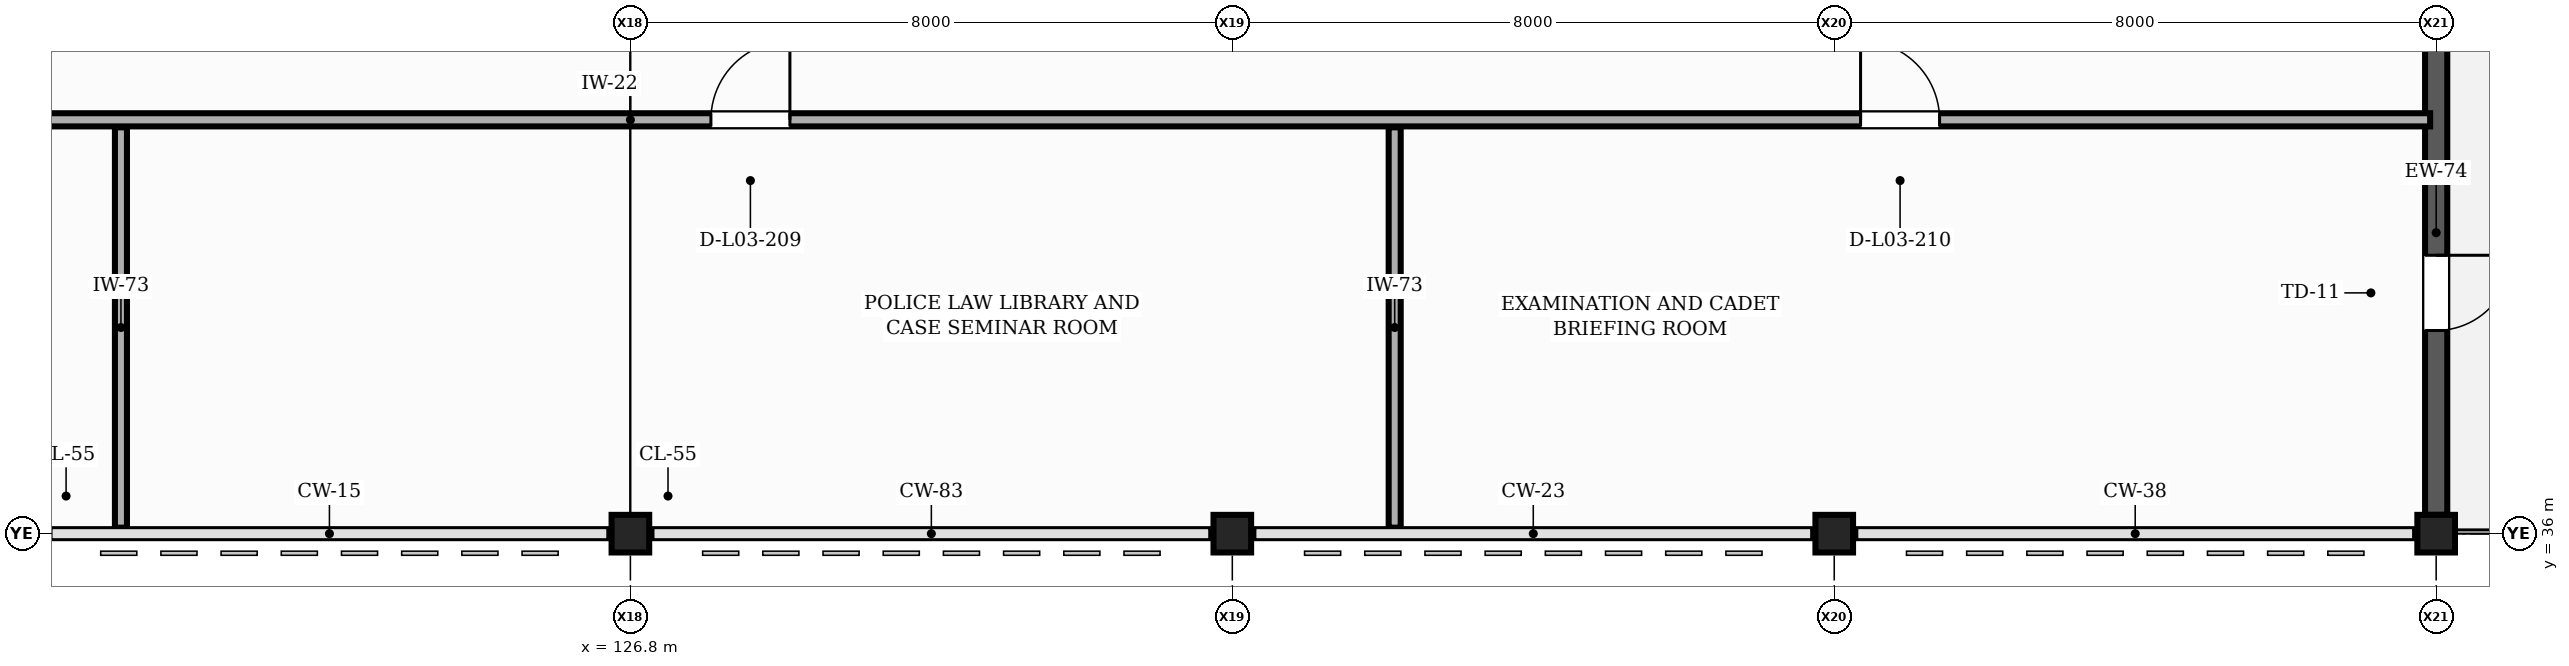
"""IFC4 building model, lengths in metres.
Left out: names, types, materials, properties, quantities, classifications, styles, units other than length and angle.
Written with IfcOpenShell. Run it as: python <this file> out.ifc"""

import sys

from ifc_helpers import new_model, si_unit, direction, frame, frame_2d, origin, origin_2d, place, context, subcontext, project, spatial, rectangle, extrude, element, fill, save


model = new_model("IFC4")
c1 = context("Model", 3, precision=1e-05, world=origin(), true_north=direction((0.0, 1.0)))
c2 = subcontext(c1, "Body", "Model", "MODEL_VIEW")
j1 = project(units=[si_unit("LENGTHUNIT", "METRE"), si_unit("PLANEANGLEUNIT", "RADIAN")], contexts=[c1])
p1 = place(None, origin())
s1 = spatial("IfcSite", under=j1, at=p1, CompositionType="ELEMENT")
p2 = place(p1, origin())
s2 = spatial("IfcBuilding", under=s1, at=p2, CompositionType="ELEMENT")
p3 = place(p2, frame((0.0, 0.0, 13.5)))
s3 = spatial("IfcBuildingStorey", under=s2, at=p3, CompositionType="ELEMENT", Elevation=13.5)
for number, where, z_axis, x_axis in (
    (1, (126.8, 36.0, 0.0), (0.0, 0.0, 1.0), (1.0, 0.0, 0.0)),
    (2, (134.8, 36.0, 0.0), (0.0, 0.0, 1.0), (1.0, 0.0, 0.0)),
    (3, (142.8, 36.0, 0.0), (0.0, 0.0, 1.0), (1.0, 0.0, 0.0)),
    (4, (150.8, 36.0, 0.0), (0.0, 0.0, 1.0), (1.0, 0.0, 0.0)),
):
    element("IfcColumn", number, at=place(p3, frame(where, z_axis=z_axis, x_axis=x_axis)), inside=s3, PredefinedType="COLUMN", context=c2, shape_type="SweptSolid", body=[
        extrude(rectangle(XDim=0.5, YDim=0.5, at=origin_2d()), origin(), (0.0, 0.0, 1.0), 4.5),
    ])
p4 = place(p3, frame((150.8, 36.25, 0.0), z_axis=(0.0, 0.0, 1.0), x_axis=(0.0, 1.0, 0.0)))
e5 = element("IfcWall", 5, at=p4, inside=s3, PredefinedType="SOLIDWALL", context=c2, shape_type="SweptSolid", body=[
    extrude(rectangle(XDim=7.5, YDim=0.295, at=frame_2d((3.75, 0.0))), origin(), (0.0, 0.0, 1.0), 3.54),
])
p5 = place(p4, frame((2.45, 0.0, 0.0)))
e6 = element("IfcOpeningElement", 6, at=p5, cuts=e5, PredefinedType="OPENING", context=c2, shape_type="SweptSolid", body=[
    extrude(rectangle(XDim=1.0, YDim=2.15, at=frame_2d((0.5, 1.075))), frame((0.0, 0.157, 0.0), z_axis=(0.0, -1.0, 0.0), x_axis=(1.0, 0.0, 0.0)), (0.0, 0.0, 1.0), 0.315),
])
for number, where, z_axis, x_axis in (
    (7, (120.029, 36.08, 0.0), (0.0, 0.0, 1.0), (0.0, 1.0, 0.0)),
    (8, (136.958, 36.08, 0.0), (0.0, 0.0, 1.0), (0.0, 1.0, 0.0)),
):
    element("IfcWall", number, at=place(p3, frame(where, z_axis=z_axis, x_axis=x_axis)), inside=s3, PredefinedType="PARTITIONING", context=c2, shape_type="SweptSolid", body=[
        extrude(rectangle(XDim=5.32, YDim=0.16, at=frame_2d((2.66, 0.0))), origin(), (0.0, 0.0, 1.0), 3.525),
    ])
p6 = place(p3, frame((102.88, 41.5, 0.0), z_axis=(0.0, 0.0, 1.0), x_axis=(1.0, 0.0, 0.0)))
e9 = element("IfcWall", 9, at=p6, inside=s3, PredefinedType="PARTITIONING", context=c2, shape_type="SweptSolid", body=[
    extrude(rectangle(XDim=47.84, YDim=0.175, at=frame_2d((23.92, 0.0))), origin(), (0.0, 0.0, 1.0), 3.525),
])
p7 = place(p6, frame((8.02, 0.0, 0.0)))
e10 = element("IfcOpeningElement", 10, at=p7, cuts=e9, PredefinedType="OPENING", context=c2, shape_type="SweptSolid", body=[
    extrude(rectangle(XDim=1.05, YDim=2.1, at=frame_2d((0.525, 1.05))), frame((0.0, 0.098, 0.0), z_axis=(0.0, -1.0, 0.0), x_axis=(1.0, 0.0, 0.0)), (0.0, 0.0, 1.0), 0.195),
])
p8 = place(p6, frame((24.99, 0.0, 0.0)))
e11 = element("IfcOpeningElement", 11, at=p8, cuts=e9, PredefinedType="OPENING", context=c2, shape_type="SweptSolid", body=[
    extrude(rectangle(XDim=1.05, YDim=2.1, at=frame_2d((0.525, 1.05))), frame((0.0, 0.098, 0.0), z_axis=(0.0, -1.0, 0.0), x_axis=(1.0, 0.0, 0.0)), (0.0, 0.0, 1.0), 0.195),
])
p9 = place(p6, frame((40.27, 0.0, 0.0)))
e12 = element("IfcOpeningElement", 12, at=p9, cuts=e9, PredefinedType="OPENING", context=c2, shape_type="SweptSolid", body=[
    extrude(rectangle(XDim=1.05, YDim=2.1, at=frame_2d((0.525, 1.05))), frame((0.0, 0.098, 0.0), z_axis=(0.0, -1.0, 0.0), x_axis=(1.0, 0.0, 0.0)), (0.0, 0.0, 1.0), 0.195),
])
p10 = place(p5, frame((1.0, 0.0, 0.0), z_axis=(0.0, 0.0, 1.0), x_axis=(-1.0, 0.0, 0.0)))
e13 = element("IfcDoor", 13, at=p10, inside=s3, OperationType="SINGLE_SWING_LEFT", PredefinedType="DOOR", context=c2, shape_type="SweptSolid", body=[
    extrude(rectangle(XDim=1.0, YDim=2.15, at=frame_2d((0.5, 1.075))), frame((0.0, 0.025, 0.0), z_axis=(0.0, -1.0, 0.0), x_axis=(1.0, 0.0, 0.0)), (0.0, 0.0, 1.0), 0.05),
])
fill(e6, e13)
p11 = place(p8, origin())
e14 = element("IfcDoor", 14, at=p11, inside=s3, OperationType="SINGLE_SWING_RIGHT", PredefinedType="DOOR", context=c2, shape_type="SweptSolid", body=[
    extrude(rectangle(XDim=1.05, YDim=2.1, at=frame_2d((0.525, 1.05))), frame((0.0, 0.025, 0.0), z_axis=(0.0, -1.0, 0.0), x_axis=(1.0, 0.0, 0.0)), (0.0, 0.0, 1.0), 0.05),
])
fill(e11, e14)
p12 = place(p9, origin())
e15 = element("IfcDoor", 15, at=p12, inside=s3, OperationType="SINGLE_SWING_LEFT", PredefinedType="DOOR", context=c2, shape_type="SweptSolid", body=[
    extrude(rectangle(XDim=1.05, YDim=2.1, at=frame_2d((0.525, 1.05))), frame((0.0, 0.025, 0.0), z_axis=(0.0, -1.0, 0.0), x_axis=(1.0, 0.0, 0.0)), (0.0, 0.0, 1.0), 0.05),
])
fill(e12, e15)
save(model, sys.argv[1])
